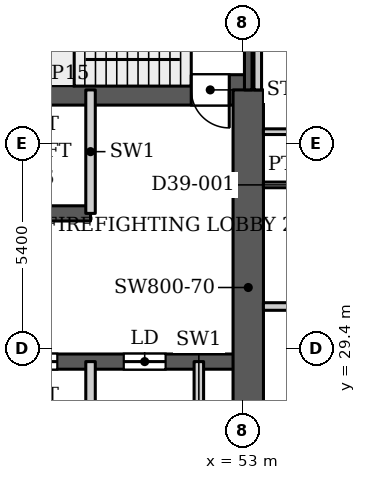
"""IFC4 building model, lengths in metres.
Left out: names, types, materials, properties, quantities, classifications, styles, units other than length and angle.
Written with IfcOpenShell. Run it as: python <this file> out.ifc"""

import sys

from ifc_helpers import new_model, si_unit, direction, frame, frame_2d, origin, place, context, subcontext, project, spatial, rectangle, extrude, source, transform, mapped, element, fill, save


model = new_model("IFC4")
c1 = context("Model", 3, precision=1e-05, world=origin(), true_north=direction((0.0, 1.0)))
c2 = subcontext(c1, "Body", "Model", "MODEL_VIEW")
j1 = project(units=[si_unit("LENGTHUNIT", "METRE"), si_unit("PLANEANGLEUNIT", "RADIAN")], contexts=[c1])
p1 = place(None, origin())
s1 = spatial("IfcSite", under=j1, at=p1, CompositionType="ELEMENT")
p2 = place(p1, origin())
s2 = spatial("IfcBuilding", under=s1, at=p2, CompositionType="ELEMENT")
p3 = place(p2, frame((0.0, 0.0, 172.1)))
s3 = spatial("IfcBuildingStorey", under=s2, at=p3, CompositionType="ELEMENT", Elevation=172.1)
p4 = place(p3, frame((34.75, 29.05, 0.0), z_axis=(0.0, 0.0, 1.0), x_axis=(1.0, 0.0, 0.0)))
e1 = element("IfcWall", 1, at=p4, inside=s3, PredefinedType="SHEAR", context=c2, shape_type="SweptSolid", body=[
    extrude(rectangle(XDim=18.4, YDim=0.4, at=frame_2d((9.2, 0.0))), origin(), (0.0, 0.0, 1.0), 3.9),
])
p5 = place(p4, frame((0.875, 0.0, 0.0)))
e2 = element("IfcOpeningElement", 2, at=p5, cuts=e1, PredefinedType="OPENING", context=c2, shape_type="SweptSolid", body=[
    extrude(rectangle(XDim=1.1, YDim=2.2, at=frame_2d((0.55, 1.1))), frame((0.0, 0.21, 0.0), z_axis=(0.0, -1.0, 0.0), x_axis=(1.0, 0.0, 0.0)), (0.0, 0.0, 1.0), 0.42),
])
p6 = place(p4, frame((3.725, 0.0, 0.0)))
e3 = element("IfcOpeningElement", 3, at=p6, cuts=e1, PredefinedType="OPENING", context=c2, shape_type="SweptSolid", body=[
    extrude(rectangle(XDim=1.1, YDim=2.2, at=frame_2d((0.55, 1.1))), frame((0.0, 0.21, 0.0), z_axis=(0.0, -1.0, 0.0), x_axis=(1.0, 0.0, 0.0)), (0.0, 0.0, 1.0), 0.42),
])
p7 = place(p4, frame((6.575, 0.0, 0.0)))
e4 = element("IfcOpeningElement", 4, at=p7, cuts=e1, PredefinedType="OPENING", context=c2, shape_type="SweptSolid", body=[
    extrude(rectangle(XDim=1.1, YDim=2.2, at=frame_2d((0.55, 1.1))), frame((0.0, 0.21, 0.0), z_axis=(0.0, -1.0, 0.0), x_axis=(1.0, 0.0, 0.0)), (0.0, 0.0, 1.0), 0.42),
])
p8 = place(p4, frame((9.425, 0.0, 0.0)))
e5 = element("IfcOpeningElement", 5, at=p8, cuts=e1, PredefinedType="OPENING", context=c2, shape_type="SweptSolid", body=[
    extrude(rectangle(XDim=1.1, YDim=2.2, at=frame_2d((0.55, 1.1))), frame((0.0, 0.21, 0.0), z_axis=(0.0, -1.0, 0.0), x_axis=(1.0, 0.0, 0.0)), (0.0, 0.0, 1.0), 0.42),
])
p9 = place(p4, frame((12.275, 0.0, 0.0)))
e6 = element("IfcOpeningElement", 6, at=p9, cuts=e1, PredefinedType="OPENING", context=c2, shape_type="SweptSolid", body=[
    extrude(rectangle(XDim=1.1, YDim=2.2, at=frame_2d((0.55, 1.1))), frame((0.0, 0.21, 0.0), z_axis=(0.0, -1.0, 0.0), x_axis=(1.0, 0.0, 0.0)), (0.0, 0.0, 1.0), 0.42),
])
p10 = place(p4, frame((15.125, 0.0, 0.0)))
e7 = element("IfcOpeningElement", 7, at=p10, cuts=e1, PredefinedType="OPENING", context=c2, shape_type="SweptSolid", body=[
    extrude(rectangle(XDim=1.1, YDim=2.2, at=frame_2d((0.55, 1.1))), frame((0.0, 0.21, 0.0), z_axis=(0.0, -1.0, 0.0), x_axis=(1.0, 0.0, 0.0)), (0.0, 0.0, 1.0), 0.42),
])
p11 = place(p3, frame((34.75, 32.95, 0.0), z_axis=(0.0, 0.0, 1.0), x_axis=(1.0, 0.0, 0.0)))
e8 = element("IfcWall", 8, at=p11, inside=s3, PredefinedType="SHEAR", context=c2, shape_type="SweptSolid", body=[
    extrude(rectangle(XDim=14.25, YDim=0.4, at=frame_2d((7.125, 0.0))), origin(), (0.0, 0.0, 1.0), 3.9),
])
p12 = place(p3, frame((34.75, 36.2, 0.0), z_axis=(0.0, 0.0, 1.0), x_axis=(1.0, 0.0, 0.0)))
e9 = element("IfcWall", 9, at=p12, inside=s3, PredefinedType="SHEAR", context=c2, shape_type="SweptSolid", body=[
    extrude(rectangle(XDim=18.4, YDim=0.8, at=frame_2d((9.2, 0.0))), origin(), (0.0, 0.0, 1.0), 3.9),
])
p13 = place(p12, frame((16.9, 0.0, 0.0)))
e10 = element("IfcOpeningElement", 10, at=p13, cuts=e9, PredefinedType="OPENING", context=c2, shape_type="SweptSolid", body=[
    extrude(rectangle(XDim=1.0, YDim=2.2, at=frame_2d((0.5, 1.1))), frame((0.0, 0.41, 0.0), z_axis=(0.0, -1.0, 0.0), x_axis=(1.0, 0.0, 0.0)), (0.0, 0.0, 1.0), 0.82),
])
p14 = place(p3, frame((53.15, 25.8, 0.0), z_axis=(0.0, 0.0, 1.0), x_axis=(0.0, 1.0, 0.0)))
e11 = element("IfcWall", 11, at=p14, inside=s3, PredefinedType="SHEAR", context=c2, shape_type="SweptSolid", body=[
    extrude(rectangle(XDim=10.4, YDim=0.8, at=frame_2d((5.2, 0.0))), origin(), (0.0, 0.0, 1.0), 3.9),
])
p15 = place(p3, frame((53.15, 36.2, 0.0), z_axis=(0.0, 0.0, 1.0), x_axis=(0.0, 1.0, 0.0)))
e12 = element("IfcWall", 12, at=p15, inside=s3, PredefinedType="SHEAR", context=c2, shape_type="SweptSolid", body=[
    extrude(rectangle(XDim=3.15, YDim=0.2, at=frame_2d((1.575, 0.0))), origin(), (0.0, 0.0, 1.0), 3.9),
])
for number, where, z_axis, x_axis in (
    (13, (49.0, 25.8, 0.0), (0.0, 0.0, 1.0), (0.0, 1.0, 0.0)),
    (14, (49.0, 32.95, 0.0), (0.0, 0.0, 1.0), (0.0, 1.0, 0.0)),
    (15, (51.85, 25.8, 0.0), (0.0, 0.0, 1.0), (0.0, 1.0, 0.0)),
):
    element("IfcWall", number, at=place(p3, frame(where, z_axis=z_axis, x_axis=x_axis)), inside=s3, PredefinedType="PARTITIONING", context=c2, shape_type="SweptSolid", body=[
        extrude(rectangle(XDim=3.25, YDim=0.25, at=frame_2d((1.625, 0.0))), origin(), (0.0, 0.0, 1.0), 3.9),
    ])
p16 = place(p3, frame((53.4, 36.199, 0.0), z_axis=(0.0, 0.0, 1.0), x_axis=(0.0, 1.0, 0.0)))
e16 = element("IfcWall", 16, at=p16, inside=s3, PredefinedType="PARTITIONING", context=c2, shape_type="SweptSolid", body=[
    extrude(rectangle(XDim=7.701, YDim=0.2, at=frame_2d((3.851, 0.0))), origin(), (0.0, 0.0, 1.0), 3.6),
])
p17 = place(p3, frame((53.549, 30.5, 0.0), z_axis=(0.0, 0.0, 1.0), x_axis=(1.0, 0.0, 0.0)))
e17 = element("IfcWall", 17, at=p17, inside=s3, PredefinedType="PARTITIONING", context=c2, shape_type="SweptSolid", body=[
    extrude(rectangle(XDim=39.151, YDim=0.2, at=frame_2d((19.575, 0.0))), origin(), (0.0, 0.0, 1.0), 3.6),
])
p18 = place(p17, frame((2.801, 0.0, 0.0)))
e18 = element("IfcOpeningElement", 18, at=p18, cuts=e17, PredefinedType="OPENING", context=c2, shape_type="SweptSolid", body=[
    extrude(rectangle(XDim=1.0, YDim=2.1, at=frame_2d((0.5, 1.05))), frame((0.0, 0.11, 0.0), z_axis=(0.0, -1.0, 0.0), x_axis=(1.0, 0.0, 0.0)), (0.0, 0.0, 1.0), 0.22),
])
p19 = place(p17, frame((9.851, 0.0, 0.0)))
e19 = element("IfcOpeningElement", 19, at=p19, cuts=e17, PredefinedType="OPENING", context=c2, shape_type="SweptSolid", body=[
    extrude(rectangle(XDim=1.0, YDim=2.1, at=frame_2d((0.5, 1.05))), frame((0.0, 0.11, 0.0), z_axis=(0.0, -1.0, 0.0), x_axis=(1.0, 0.0, 0.0)), (0.0, 0.0, 1.0), 0.22),
])
p20 = place(p17, frame((28.751, 0.0, 0.0)))
e20 = element("IfcOpeningElement", 20, at=p20, cuts=e17, PredefinedType="OPENING", context=c2, shape_type="SweptSolid", body=[
    extrude(rectangle(XDim=1.0, YDim=2.1, at=frame_2d((0.5, 1.05))), frame((0.0, 0.11, 0.0), z_axis=(0.0, -1.0, 0.0), x_axis=(1.0, 0.0, 0.0)), (0.0, 0.0, 1.0), 0.22),
])
p21 = place(p17, frame((32.651, 0.0, 0.0)))
e21 = element("IfcOpeningElement", 21, at=p21, cuts=e17, PredefinedType="OPENING", context=c2, shape_type="SweptSolid", body=[
    extrude(rectangle(XDim=1.0, YDim=2.1, at=frame_2d((0.5, 1.05))), frame((0.0, 0.11, 0.0), z_axis=(0.0, -1.0, 0.0), x_axis=(1.0, 0.0, 0.0)), (0.0, 0.0, 1.0), 0.22),
])
p22 = place(p3, frame((53.549, 33.7, 0.0), z_axis=(0.0, 0.0, 1.0), x_axis=(1.0, 0.0, 0.0)))
e22 = element("IfcWall", 22, at=p22, inside=s3, PredefinedType="PARTITIONING", context=c2, shape_type="SweptSolid", body=[
    extrude(rectangle(XDim=2.176, YDim=0.15, at=frame_2d((1.088, 0.0))), origin(), (0.0, 0.0, 1.0), 3.6),
])
p23 = place(p22, frame((0.651, 0.0, 0.0)))
e23 = element("IfcOpeningElement", 23, at=p23, cuts=e22, PredefinedType="OPENING", context=c2, shape_type="SweptSolid", body=[
    extrude(rectangle(XDim=0.8, YDim=2.1, at=frame_2d((0.4, 1.05))), frame((0.0, 0.085, 0.0), z_axis=(0.0, -1.0, 0.0), x_axis=(1.0, 0.0, 0.0)), (0.0, 0.0, 1.0), 0.17),
])
p24 = place(p3, frame((53.549, 35.1, 0.0), z_axis=(0.0, 0.0, 1.0), x_axis=(1.0, 0.0, 0.0)))
e24 = element("IfcWall", 24, at=p24, inside=s3, PredefinedType="PARTITIONING", context=c2, shape_type="SweptSolid", body=[
    extrude(rectangle(XDim=9.351, YDim=0.15, at=frame_2d((4.675, 0.0))), origin(), (0.0, 0.0, 1.0), 3.6),
])
p25 = place(p24, frame((7.351, 0.0, 0.0)))
e25 = element("IfcOpeningElement", 25, at=p25, cuts=e24, PredefinedType="OPENING", context=c2, shape_type="SweptSolid", body=[
    extrude(rectangle(XDim=0.9, YDim=2.1, at=frame_2d((0.45, 1.05))), frame((0.0, 0.085, 0.0), z_axis=(0.0, -1.0, 0.0), x_axis=(1.0, 0.0, 0.0)), (0.0, 0.0, 1.0), 0.17),
])
p26 = place(p24, frame((2.501, 0.0, 0.0)))
e26 = element("IfcOpeningElement", 26, at=p26, cuts=e24, PredefinedType="OPENING", context=c2, shape_type="SweptSolid", body=[
    extrude(rectangle(XDim=1.0, YDim=2.1, at=frame_2d((0.5, 1.05))), frame((0.0, 0.085, 0.0), z_axis=(0.0, -1.0, 0.0), x_axis=(1.0, 0.0, 0.0)), (0.0, 0.0, 1.0), 0.17),
])
m1 = source(origin(), c2, "Body", "SweptSolid", [
    extrude(rectangle(XDim=1.1, YDim=2.2, at=frame_2d((0.55, 1.1))), frame((0.0, 0.025, 0.0), z_axis=(0.0, -1.0, 0.0), x_axis=(1.0, 0.0, 0.0)), (0.0, 0.0, 1.0), 0.05),
])
p27 = place(p9, origin())
e27 = element("IfcDoor", 27, at=p27, inside=s3, OperationType="SLIDING_TO_LEFT", PredefinedType="DOOR", context=c2, shape_type="MappedRepresentation", body=[
    mapped(m1, transform((0.0, 0.0, 0.0), x_axis=(1.0, 0.0, 0.0), y_axis=(0.0, 1.0, 0.0), z_axis=(0.0, 0.0, 1.0), scale=1.0)),
])
fill(e6, e27)
p28 = place(p10, origin())
e28 = element("IfcDoor", 28, at=p28, inside=s3, OperationType="SLIDING_TO_LEFT", PredefinedType="DOOR", context=c2, shape_type="MappedRepresentation", body=[
    mapped(m1, transform((0.0, 0.0, 0.0), x_axis=(1.0, 0.0, 0.0), y_axis=(0.0, 1.0, 0.0), z_axis=(0.0, 0.0, 1.0), scale=1.0)),
])
fill(e7, e28)
m2 = source(origin(), c2, "Body", "SweptSolid", [
    extrude(rectangle(XDim=1.0, YDim=2.2, at=frame_2d((0.5, 1.1))), frame((0.0, 0.025, 0.0), z_axis=(0.0, -1.0, 0.0), x_axis=(1.0, 0.0, 0.0)), (0.0, 0.0, 1.0), 0.05),
])
p29 = place(p13, origin())
e29 = element("IfcDoor", 29, at=p29, inside=s3, OperationType="SINGLE_SWING_RIGHT", PredefinedType="DOOR", context=c2, shape_type="MappedRepresentation", body=[
    mapped(m2, transform((0.0, 0.0, 0.0), x_axis=(1.0, 0.0, 0.0), y_axis=(0.0, 1.0, 0.0), z_axis=(0.0, 0.0, 1.0), scale=1.0)),
])
fill(e10, e29)
save(model, sys.argv[1])
